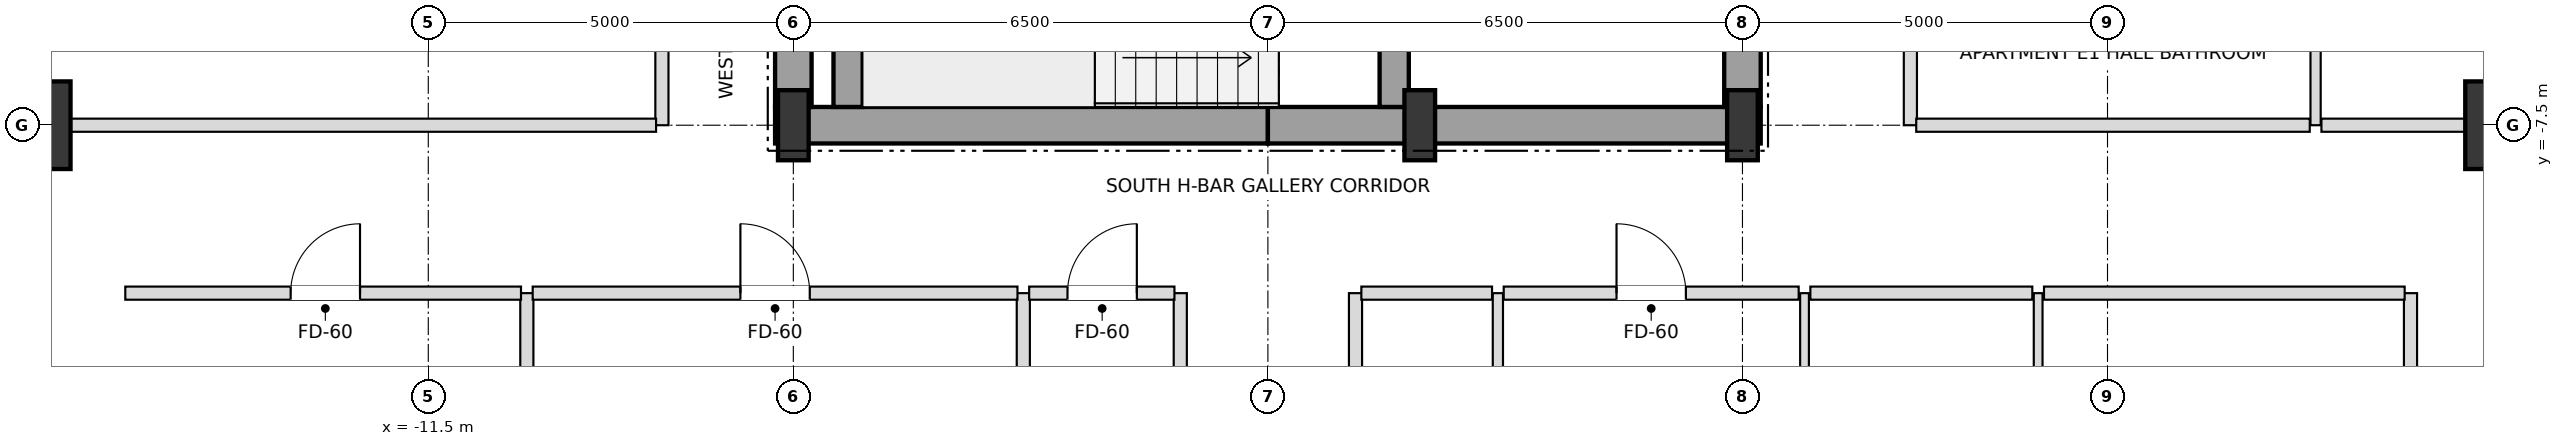
"""IFC4 building model, lengths in metres.
Left out: names, types, materials, properties, quantities, classifications, styles, units other than length and angle.
Written with IfcOpenShell. Run it as: python <this file> out.ifc"""

import sys

from ifc_helpers import new_model, si_unit, direction, frame, frame_2d, origin, origin_2d, place, context, subcontext, project, spatial, rectangle, i_section, extrude, element, fill, save


model = new_model("IFC4")
c1 = context("Model", 3, precision=1e-05, world=origin(), true_north=direction((0.0, 1.0)))
c2 = subcontext(c1, "Body", "Model", "MODEL_VIEW")
j1 = project(units=[si_unit("LENGTHUNIT", "METRE"), si_unit("PLANEANGLEUNIT", "RADIAN")], contexts=[c1])
p1 = place(None, origin())
s1 = spatial("IfcSite", under=j1, at=p1, CompositionType="ELEMENT")
p2 = place(p1, origin())
s2 = spatial("IfcBuilding", under=s1, at=p2, CompositionType="ELEMENT")
p3 = place(p2, frame((0.0, 0.0, 147.6)))
s3 = spatial("IfcBuildingStorey", under=s2, at=p3, CompositionType="ELEMENT", Elevation=147.6)
for number, where, z_axis, x_axis in (
    (1, (-6.5, -7.5, 0.0), (0.0, 0.0, 1.0), (1.0, 0.0, 0.0)),
    (2, (2.08, -7.5, 0.0), (0.0, 0.0, 1.0), (1.0, 0.0, 0.0)),
    (3, (6.5, -7.5, 0.0), (0.0, 0.0, 1.0), (1.0, 0.0, 0.0)),
):
    element("IfcColumn", number, at=place(p3, frame(where, z_axis=z_axis, x_axis=x_axis)), inside=s3, PredefinedType="COLUMN", context=c2, shape_type="SweptSolid", body=[
        extrude(i_section(OverallWidth=0.42, OverallDepth=0.96, WebThickness=0.022, FlangeThickness=0.034, at=origin_2d()), origin(), (0.0, 0.0, 1.0), 3.6),
    ])
for number, where, z_axis, x_axis in (
    (4, (17.0, -7.5, 0.0), (0.0, 0.0, 1.0), (1.0, 0.0, 0.0)),
    (5, (-17.0, -7.5, 0.0), (0.0, 0.0, 1.0), (1.0, 0.0, 0.0)),
):
    element("IfcColumn", number, at=place(p3, frame(where, z_axis=z_axis, x_axis=x_axis)), inside=s3, PredefinedType="USERDEFINED", context=c2, shape_type="SweptSolid", body=[
        extrude(rectangle(XDim=1.2, YDim=1.2, at=origin_2d()), origin(), (0.0, 0.0, 1.0), 3.6),
    ])
for number, where, z_axis, x_axis in (
    (6, (-6.75, -7.5, 0.0), (0.0, 0.0, 1.0), (1.0, 0.0, 0.0)),
    (7, (0.0, -7.5, 0.0), (0.0, 0.0, 1.0), (1.0, 0.0, 0.0)),
):
    element("IfcWall", number, at=place(p3, frame(where, z_axis=z_axis, x_axis=x_axis)), inside=s3, PredefinedType="SHEAR", context=c2, shape_type="SweptSolid", body=[
        extrude(rectangle(XDim=6.75, YDim=0.5, at=frame_2d((3.375, 0.0))), origin(), (0.0, 0.0, 1.0), 3.38),
    ])
p4 = place(p3, frame((-6.5, -7.25, 0.0), z_axis=(0.0, 0.0, 1.0), x_axis=(0.0, 1.0, 0.0)))
e8 = element("IfcWall", 8, at=p4, inside=s3, PredefinedType="SHEAR", context=c2, shape_type="SweptSolid", body=[
    extrude(rectangle(XDim=3.55, YDim=0.5, at=frame_2d((1.775, 0.0))), origin(), (0.0, 0.0, 1.0), 3.38),
])
p5 = place(p3, frame((6.5, -7.25, 0.0), z_axis=(0.0, 0.0, 1.0), x_axis=(0.0, 1.0, 0.0)))
e9 = element("IfcWall", 9, at=p5, inside=s3, PredefinedType="SHEAR", context=c2, shape_type="SweptSolid", body=[
    extrude(rectangle(XDim=5.75, YDim=0.5, at=frame_2d((2.875, 0.0))), origin(), (0.0, 0.0, 1.0), 3.38),
])
p6 = place(p5, frame((0.85, 0.0, 0.0)))
e10 = element("IfcOpeningElement", 10, at=p6, cuts=e9, PredefinedType="OPENING", context=c2, shape_type="SweptSolid", body=[
    extrude(rectangle(XDim=1.05, YDim=2.15, at=frame_2d((0.525, 1.075))), frame((0.0, 0.26, 0.0), z_axis=(0.0, -1.0, 0.0), x_axis=(1.0, 0.0, 0.0)), (0.0, 0.0, 1.0), 0.52),
])
p7 = place(p3, frame((-5.75, -7.25, 0.0), z_axis=(0.0, 0.0, 1.0), x_axis=(0.0, 1.0, 0.0)))
e11 = element("IfcWall", 11, at=p7, inside=s3, PredefinedType="SHEAR", context=c2, shape_type="SweptSolid", body=[
    extrude(rectangle(XDim=2.9, YDim=0.4, at=frame_2d((1.45, 0.0))), origin(), (0.0, 0.0, 1.0), 3.38),
])
p8 = place(p3, frame((1.73, -7.25, 0.0), z_axis=(0.0, 0.0, 1.0), x_axis=(0.0, 1.0, 0.0)))
e12 = element("IfcWall", 12, at=p8, inside=s3, PredefinedType="SHEAR", context=c2, shape_type="SweptSolid", body=[
    extrude(rectangle(XDim=3.3, YDim=0.4, at=frame_2d((1.65, 0.0))), origin(), (0.0, 0.0, 1.0), 3.38),
])
p9 = place(p8, frame((0.9, 0.0, 0.0)))
e13 = element("IfcOpeningElement", 13, at=p9, cuts=e12, PredefinedType="OPENING", context=c2, shape_type="SweptSolid", body=[
    extrude(rectangle(XDim=1.05, YDim=2.15, at=frame_2d((0.525, 1.075))), frame((0.0, 0.21, 0.0), z_axis=(0.0, -1.0, 0.0), x_axis=(1.0, 0.0, 0.0)), (0.0, 0.0, 1.0), 0.42),
])
p10 = place(p3, frame((-10.15, -23.15, 0.0), z_axis=(0.0, 0.0, 1.0), x_axis=(0.0, 1.0, 0.0)))
e14 = element("IfcWall", 14, at=p10, inside=s3, PredefinedType="PARTITIONING", context=c2, shape_type="SweptSolid", body=[
    extrude(rectangle(XDim=13.35, YDim=0.18, at=frame_2d((6.675, 0.0))), origin(), (0.0, 0.0, 1.0), 2.816),
])
p11 = place(p3, frame((-8.3, -7.5, 0.0), z_axis=(0.0, 0.0, 1.0), x_axis=(0.0, 1.0, 0.0)))
e15 = element("IfcWall", 15, at=p11, inside=s3, PredefinedType="PARTITIONING", context=c2, shape_type="SweptSolid", body=[
    extrude(rectangle(XDim=15.0, YDim=0.18, at=frame_2d((7.5, 0.0))), origin(), (0.0, 0.0, 1.0), 3.38),
])
p12 = place(p11, frame((1.525, 0.0, 0.0)))
e16 = element("IfcOpeningElement", 16, at=p12, cuts=e15, PredefinedType="OPENING", context=c2, shape_type="SweptSolid", body=[
    extrude(rectangle(XDim=0.95, YDim=2.15, at=frame_2d((0.475, 1.075))), frame((0.0, 0.1, 0.0), z_axis=(0.0, -1.0, 0.0), x_axis=(1.0, 0.0, 0.0)), (0.0, 0.0, 1.0), 0.2),
])
p13 = place(p3, frame((-3.35, -23.15, 0.0), z_axis=(0.0, 0.0, 1.0), x_axis=(0.0, 1.0, 0.0)))
e17 = element("IfcWall", 17, at=p13, inside=s3, PredefinedType="PARTITIONING", context=c2, shape_type="SweptSolid", body=[
    extrude(rectangle(XDim=13.35, YDim=0.18, at=frame_2d((6.675, 0.0))), origin(), (0.0, 0.0, 1.0), 2.816),
])
p14 = place(p13, frame((4.605, 0.0, 0.0)))
e18 = element("IfcOpeningElement", 18, at=p14, cuts=e17, PredefinedType="OPENING", context=c2, shape_type="SweptSolid", body=[
    extrude(rectangle(XDim=0.95, YDim=2.15, at=frame_2d((0.475, 1.075))), frame((0.0, 0.1, 0.0), z_axis=(0.0, -1.0, 0.0), x_axis=(1.0, 0.0, 0.0)), (0.0, 0.0, 1.0), 0.2),
])
for number, where, z_axis, x_axis in (
    (19, (-1.2, -23.15, 0.0), (0.0, 0.0, 1.0), (0.0, 1.0, 0.0)),
    (20, (1.2, -23.15, 0.0), (0.0, 0.0, 1.0), (0.0, 1.0, 0.0)),
):
    element("IfcWall", number, at=place(p3, frame(where, z_axis=z_axis, x_axis=x_axis)), inside=s3, PredefinedType="PARTITIONING", context=c2, shape_type="SweptSolid", body=[
        extrude(rectangle(XDim=13.35, YDim=0.18, at=frame_2d((6.675, 0.0))), origin(), (0.0, 0.0, 1.0), 2.816),
    ])
p15 = place(p3, frame((3.15, -17.15, 0.0), z_axis=(0.0, 0.0, 1.0), x_axis=(0.0, 1.0, 0.0)))
e21 = element("IfcWall", 21, at=p15, inside=s3, PredefinedType="PARTITIONING", context=c2, shape_type="SweptSolid", body=[
    extrude(rectangle(XDim=7.35, YDim=0.14, at=frame_2d((3.675, 0.0))), origin(), (0.0, 0.0, 1.0), 3.38),
])
p16 = place(p15, frame((3.23, 0.0, 0.0)))
e22 = element("IfcOpeningElement", 22, at=p16, cuts=e21, PredefinedType="OPENING", context=c2, shape_type="SweptSolid", body=[
    extrude(rectangle(XDim=0.9, YDim=2.1, at=frame_2d((0.45, 1.05))), frame((0.0, 0.08, 0.0), z_axis=(0.0, -1.0, 0.0), x_axis=(1.0, 0.0, 0.0)), (0.0, 0.0, 1.0), 0.16),
])
p17 = place(p3, frame((7.35, -23.15, 0.0), z_axis=(0.0, 0.0, 1.0), x_axis=(0.0, 1.0, 0.0)))
e23 = element("IfcWall", 23, at=p17, inside=s3, PredefinedType="PARTITIONING", context=c2, shape_type="SweptSolid", body=[
    extrude(rectangle(XDim=13.35, YDim=0.12, at=frame_2d((6.675, 0.0))), origin(), (0.0, 0.0, 1.0), 2.816),
])
p18 = place(p17, frame((9.205, 0.0, 0.0)))
e24 = element("IfcOpeningElement", 24, at=p18, cuts=e23, PredefinedType="OPENING", context=c2, shape_type="SweptSolid", body=[
    extrude(rectangle(XDim=0.95, YDim=2.1, at=frame_2d((0.475, 1.05))), frame((0.0, 0.07, 0.0), z_axis=(0.0, -1.0, 0.0), x_axis=(1.0, 0.0, 0.0)), (0.0, 0.0, 1.0), 0.14),
])
p19 = place(p17, frame((1.399, 0.0, 0.0)))
e25 = element("IfcOpeningElement", 25, at=p19, cuts=e23, PredefinedType="OPENING", context=c2, shape_type="SweptSolid", body=[
    extrude(rectangle(XDim=0.9, YDim=2.1, at=frame_2d((0.45, 1.05))), frame((0.0, 0.07, 0.0), z_axis=(0.0, -1.0, 0.0), x_axis=(1.0, 0.0, 0.0)), (0.0, 0.0, 1.0), 0.14),
])
p20 = place(p3, frame((8.8, -7.5, 0.0), z_axis=(0.0, 0.0, 1.0), x_axis=(0.0, 1.0, 0.0)))
e26 = element("IfcWall", 26, at=p20, inside=s3, PredefinedType="PARTITIONING", context=c2, shape_type="SweptSolid", body=[
    extrude(rectangle(XDim=15.0, YDim=0.18, at=frame_2d((7.5, 0.0))), origin(), (0.0, 0.0, 1.0), 3.38),
])
p21 = place(p20, frame((3.475, 0.0, 0.0)))
e27 = element("IfcOpeningElement", 27, at=p21, cuts=e26, PredefinedType="OPENING", context=c2, shape_type="SweptSolid", body=[
    extrude(rectangle(XDim=0.95, YDim=2.15, at=frame_2d((0.475, 1.075))), frame((0.0, 0.1, 0.0), z_axis=(0.0, -1.0, 0.0), x_axis=(1.0, 0.0, 0.0)), (0.0, 0.0, 1.0), 0.2),
])
p22 = place(p3, frame((10.55, -23.15, 0.0), z_axis=(0.0, 0.0, 1.0), x_axis=(0.0, 1.0, 0.0)))
e28 = element("IfcWall", 28, at=p22, inside=s3, PredefinedType="PARTITIONING", context=c2, shape_type="SweptSolid", body=[
    extrude(rectangle(XDim=13.35, YDim=0.12, at=frame_2d((6.675, 0.0))), origin(), (0.0, 0.0, 1.0), 2.816),
])
p23 = place(p22, frame((8.687, 0.0, 0.0)))
e29 = element("IfcOpeningElement", 29, at=p23, cuts=e28, PredefinedType="OPENING", context=c2, shape_type="SweptSolid", body=[
    extrude(rectangle(XDim=0.95, YDim=2.1, at=frame_2d((0.475, 1.05))), frame((0.0, 0.07, 0.0), z_axis=(0.0, -1.0, 0.0), x_axis=(1.0, 0.0, 0.0)), (0.0, 0.0, 1.0), 0.14),
])
p24 = place(p22, frame((1.399, 0.0, 0.0)))
e30 = element("IfcOpeningElement", 30, at=p24, cuts=e28, PredefinedType="OPENING", context=c2, shape_type="SweptSolid", body=[
    extrude(rectangle(XDim=0.9, YDim=2.1, at=frame_2d((0.45, 1.05))), frame((0.0, 0.07, 0.0), z_axis=(0.0, -1.0, 0.0), x_axis=(1.0, 0.0, 0.0)), (0.0, 0.0, 1.0), 0.14),
])
p25 = place(p3, frame((14.35, -7.5, 0.0), z_axis=(0.0, 0.0, 1.0), x_axis=(0.0, 1.0, 0.0)))
e31 = element("IfcWall", 31, at=p25, inside=s3, PredefinedType="PARTITIONING", context=c2, shape_type="SweptSolid", body=[
    extrude(rectangle(XDim=15.0, YDim=0.14, at=frame_2d((7.5, 0.0))), origin(), (0.0, 0.0, 1.0), 3.38),
])
p26 = place(p25, frame((3.475, 0.0, 0.0)))
e32 = element("IfcOpeningElement", 32, at=p26, cuts=e31, PredefinedType="OPENING", context=c2, shape_type="SweptSolid", body=[
    extrude(rectangle(XDim=0.95, YDim=2.1, at=frame_2d((0.475, 1.05))), frame((0.0, 0.08, 0.0), z_axis=(0.0, -1.0, 0.0), x_axis=(1.0, 0.0, 0.0)), (0.0, 0.0, 1.0), 0.16),
])
p27 = place(p3, frame((15.65, -17.15, 0.0), z_axis=(0.0, 0.0, 1.0), x_axis=(0.0, 1.0, 0.0)))
e33 = element("IfcWall", 33, at=p27, inside=s3, PredefinedType="PARTITIONING", context=c2, shape_type="SweptSolid", body=[
    extrude(rectangle(XDim=7.35, YDim=0.18, at=frame_2d((3.675, 0.0))), origin(), (0.0, 0.0, 1.0), 2.736),
])
p28 = place(p3, frame((-15.65, -9.8, 0.0), z_axis=(0.0, 0.0, 1.0), x_axis=(1.0, 0.0, 0.0)))
e34 = element("IfcWall", 34, at=p28, inside=s3, PredefinedType="PARTITIONING", context=c2, shape_type="SweptSolid", body=[
    extrude(rectangle(XDim=5.42, YDim=0.18, at=frame_2d((2.71, 0.0))), origin(), (0.0, 0.0, 1.0), 3.38),
])
p29 = place(p28, frame((2.265, 0.0, 0.0)))
e35 = element("IfcOpeningElement", 35, at=p29, cuts=e34, PredefinedType="OPENING", context=c2, shape_type="SweptSolid", body=[
    extrude(rectangle(XDim=0.95, YDim=2.15, at=frame_2d((0.475, 1.075))), frame((0.0, 0.1, 0.0), z_axis=(0.0, -1.0, 0.0), x_axis=(1.0, 0.0, 0.0)), (0.0, 0.0, 1.0), 0.2),
])
p30 = place(p3, frame((-10.07, -9.8, 0.0), z_axis=(0.0, 0.0, 1.0), x_axis=(1.0, 0.0, 0.0)))
e36 = element("IfcWall", 36, at=p30, inside=s3, PredefinedType="PARTITIONING", context=c2, shape_type="SweptSolid", body=[
    extrude(rectangle(XDim=6.64, YDim=0.18, at=frame_2d((3.32, 0.0))), origin(), (0.0, 0.0, 1.0), 2.816),
])
p31 = place(p30, frame((2.845, 0.0, 0.0)))
e37 = element("IfcOpeningElement", 37, at=p31, cuts=e36, PredefinedType="OPENING", context=c2, shape_type="SweptSolid", body=[
    extrude(rectangle(XDim=0.95, YDim=2.15, at=frame_2d((0.475, 1.075))), frame((0.0, 0.1, 0.0), z_axis=(0.0, -1.0, 0.0), x_axis=(1.0, 0.0, 0.0)), (0.0, 0.0, 1.0), 0.2),
])
p32 = place(p3, frame((-3.27, -9.8, 0.0), z_axis=(0.0, 0.0, 1.0), x_axis=(1.0, 0.0, 0.0)))
e38 = element("IfcWall", 38, at=p32, inside=s3, PredefinedType="PARTITIONING", context=c2, shape_type="SweptSolid", body=[
    extrude(rectangle(XDim=1.99, YDim=0.18, at=frame_2d((0.995, 0.0))), origin(), (0.0, 0.0, 1.0), 3.38),
])
p33 = place(p32, frame((0.525, 0.0, 0.0)))
e39 = element("IfcOpeningElement", 39, at=p33, cuts=e38, PredefinedType="OPENING", context=c2, shape_type="SweptSolid", body=[
    extrude(rectangle(XDim=0.95, YDim=2.15, at=frame_2d((0.475, 1.075))), frame((0.0, 0.1, 0.0), z_axis=(0.0, -1.0, 0.0), x_axis=(1.0, 0.0, 0.0)), (0.0, 0.0, 1.0), 0.2),
])
p34 = place(p3, frame((1.28, -9.8, 0.0), z_axis=(0.0, 0.0, 1.0), x_axis=(1.0, 0.0, 0.0)))
e40 = element("IfcWall", 40, at=p34, inside=s3, PredefinedType="PARTITIONING", context=c2, shape_type="SweptSolid", body=[
    extrude(rectangle(XDim=1.79, YDim=0.18, at=frame_2d((0.895, 0.0))), origin(), (0.0, 0.0, 1.0), 3.38),
])
p35 = place(p3, frame((3.23, -9.8, 0.0), z_axis=(0.0, 0.0, 1.0), x_axis=(1.0, 0.0, 0.0)))
e41 = element("IfcWall", 41, at=p35, inside=s3, PredefinedType="PARTITIONING", context=c2, shape_type="SweptSolid", body=[
    extrude(rectangle(XDim=4.04, YDim=0.18, at=frame_2d((2.02, 0.0))), origin(), (0.0, 0.0, 1.0), 2.816),
])
p36 = place(p35, frame((1.545, 0.0, 0.0)))
e42 = element("IfcOpeningElement", 42, at=p36, cuts=e41, PredefinedType="OPENING", context=c2, shape_type="SweptSolid", body=[
    extrude(rectangle(XDim=0.95, YDim=2.15, at=frame_2d((0.475, 1.075))), frame((0.0, 0.1, 0.0), z_axis=(0.0, -1.0, 0.0), x_axis=(1.0, 0.0, 0.0)), (0.0, 0.0, 1.0), 0.2),
])
p37 = place(p3, frame((7.43, -9.8, 0.0), z_axis=(0.0, 0.0, 1.0), x_axis=(1.0, 0.0, 0.0)))
e43 = element("IfcWall", 43, at=p37, inside=s3, PredefinedType="PARTITIONING", context=c2, shape_type="SweptSolid", body=[
    extrude(rectangle(XDim=3.04, YDim=0.18, at=frame_2d((1.52, 0.0))), origin(), (0.0, 0.0, 1.0), 3.38),
])
p38 = place(p3, frame((10.63, -9.8, 0.0), z_axis=(0.0, 0.0, 1.0), x_axis=(1.0, 0.0, 0.0)))
e44 = element("IfcWall", 44, at=p38, inside=s3, PredefinedType="PARTITIONING", context=c2, shape_type="SweptSolid", body=[
    extrude(rectangle(XDim=4.94, YDim=0.18, at=frame_2d((2.47, 0.0))), origin(), (0.0, 0.0, 1.0), 3.38),
])
p39 = place(p3, frame((-20.15, -7.5, 0.0), z_axis=(0.0, 0.0, 1.0), x_axis=(1.0, 0.0, 0.0)))
e45 = element("IfcWall", 45, at=p39, inside=s3, PredefinedType="PARTITIONING", context=c2, shape_type="SweptSolid", body=[
    extrude(rectangle(XDim=11.77, YDim=0.18, at=frame_2d((5.885, 0.0))), origin(), (0.0, 0.0, 1.0), 2.816),
])
p40 = place(p3, frame((8.88, -7.5, 0.0), z_axis=(0.0, 0.0, 1.0), x_axis=(1.0, 0.0, 0.0)))
e46 = element("IfcWall", 46, at=p40, inside=s3, PredefinedType="PARTITIONING", context=c2, shape_type="SweptSolid", body=[
    extrude(rectangle(XDim=5.39, YDim=0.18, at=frame_2d((2.695, 0.0))), origin(), (0.0, 0.0, 1.0), 2.816),
])
p41 = place(p3, frame((14.43, -7.5, 0.0), z_axis=(0.0, 0.0, 1.0), x_axis=(1.0, 0.0, 0.0)))
e47 = element("IfcWall", 47, at=p41, inside=s3, PredefinedType="PARTITIONING", context=c2, shape_type="SweptSolid", body=[
    extrude(rectangle(XDim=5.72, YDim=0.18, at=frame_2d((2.86, 0.0))), origin(), (0.0, 0.0, 1.0), 2.816),
])
p42 = place(p33, origin())
e48 = element("IfcDoor", 48, at=p42, inside=s3, OperationType="SINGLE_SWING_RIGHT", PredefinedType="DOOR", context=c2, shape_type="SweptSolid", body=[
    extrude(rectangle(XDim=0.95, YDim=2.15, at=frame_2d((0.475, 1.075))), frame((0.0, 0.025, 0.0), z_axis=(0.0, -1.0, 0.0), x_axis=(1.0, 0.0, 0.0)), (0.0, 0.0, 1.0), 0.05),
])
fill(e39, e48)
p43 = place(p29, origin())
e49 = element("IfcDoor", 49, at=p43, inside=s3, OperationType="SINGLE_SWING_RIGHT", PredefinedType="DOOR", context=c2, shape_type="SweptSolid", body=[
    extrude(rectangle(XDim=0.95, YDim=2.15, at=frame_2d((0.475, 1.075))), frame((0.0, 0.025, 0.0), z_axis=(0.0, -1.0, 0.0), x_axis=(1.0, 0.0, 0.0)), (0.0, 0.0, 1.0), 0.05),
])
fill(e35, e49)
p44 = place(p31, origin())
e50 = element("IfcDoor", 50, at=p44, inside=s3, OperationType="SINGLE_SWING_LEFT", PredefinedType="DOOR", context=c2, shape_type="SweptSolid", body=[
    extrude(rectangle(XDim=0.95, YDim=2.15, at=frame_2d((0.475, 1.075))), frame((0.0, 0.025, 0.0), z_axis=(0.0, -1.0, 0.0), x_axis=(1.0, 0.0, 0.0)), (0.0, 0.0, 1.0), 0.05),
])
fill(e37, e50)
p45 = place(p36, origin())
e51 = element("IfcDoor", 51, at=p45, inside=s3, OperationType="SINGLE_SWING_LEFT", PredefinedType="DOOR", context=c2, shape_type="SweptSolid", body=[
    extrude(rectangle(XDim=0.95, YDim=2.15, at=frame_2d((0.475, 1.075))), frame((0.0, 0.025, 0.0), z_axis=(0.0, -1.0, 0.0), x_axis=(1.0, 0.0, 0.0)), (0.0, 0.0, 1.0), 0.05),
])
fill(e42, e51)
save(model, sys.argv[1])
